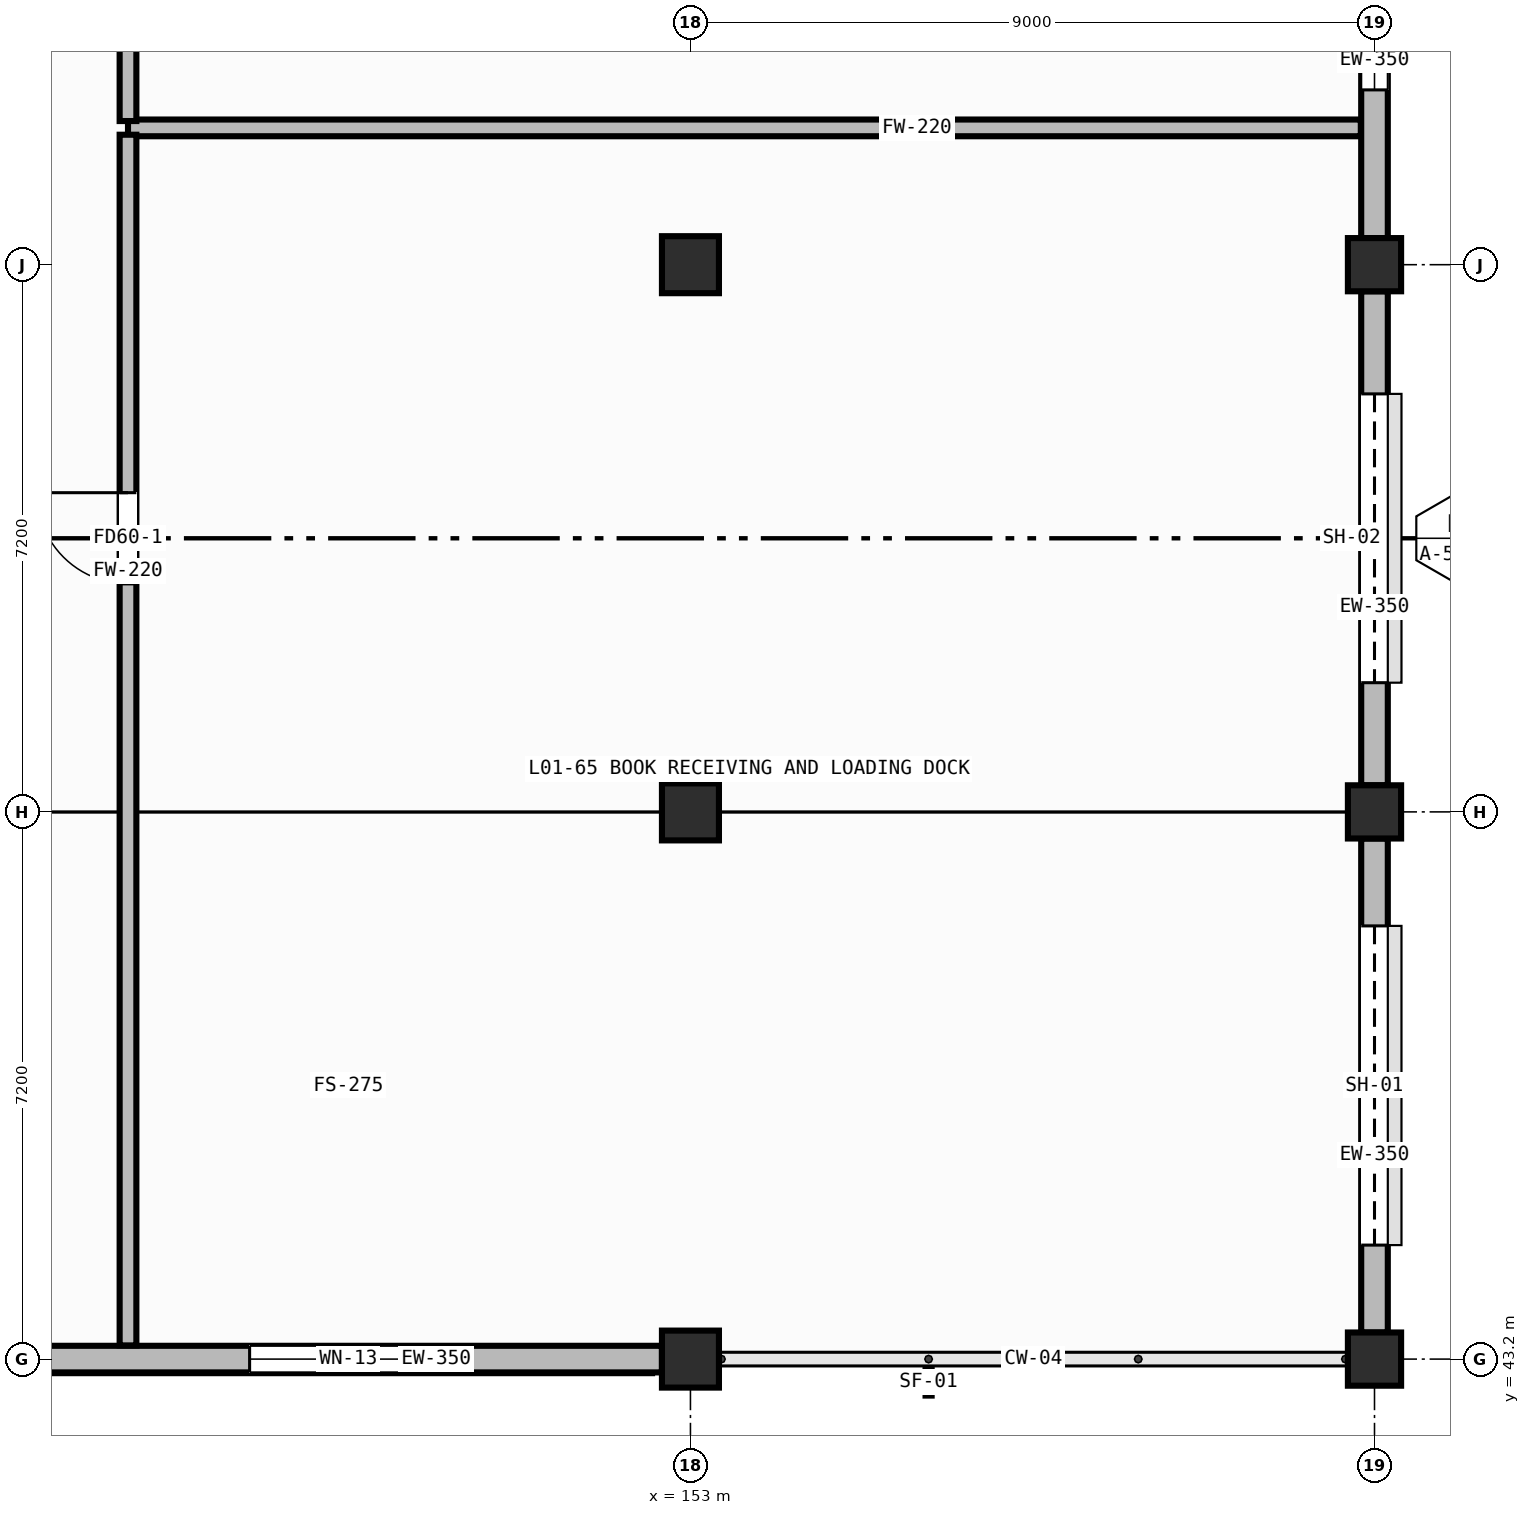
"""IFC4 building model, lengths in metres.
Left out: names, types, materials, properties, quantities, classifications, styles, units other than length and angle.
Written with IfcOpenShell. Run it as: python <this file> out.ifc"""

import sys

from ifc_helpers import new_model, si_unit, direction, frame, frame_2d, origin, origin_2d, place, context, subcontext, project, spatial, rectangle, hollow_rectangle, extrude, element, fill, save


model = new_model("IFC4")
c1 = context("Model", 3, precision=1e-05, world=origin(), true_north=direction((0.0, 1.0)))
c2 = subcontext(c1, "Body", "Model", "MODEL_VIEW")
j1 = project(units=[si_unit("LENGTHUNIT", "METRE"), si_unit("PLANEANGLEUNIT", "RADIAN")], contexts=[c1])
p1 = place(None, origin())
s1 = spatial("IfcSite", under=j1, at=p1, CompositionType="ELEMENT")
p2 = place(p1, origin())
s2 = spatial("IfcBuilding", under=s1, at=p2, CompositionType="ELEMENT")
p3 = place(p2, origin())
s3 = spatial("IfcBuildingStorey", under=s2, at=p3, CompositionType="ELEMENT", Elevation=0.0)
for number, where, z_axis, x_axis in (
    (1, (153.0, 43.2, 0.0), (0.0, 0.0, 1.0), (1.0, 0.0, 0.0)),
    (2, (153.0, 50.4, 0.0), (0.0, 0.0, 1.0), (1.0, 0.0, 0.0)),
    (3, (153.0, 57.6, 0.0), (0.0, 0.0, 1.0), (1.0, 0.0, 0.0)),
):
    element("IfcColumn", number, at=place(p3, frame(where, z_axis=z_axis, x_axis=x_axis)), inside=s3, PredefinedType="COLUMN", context=c2, shape_type="SweptSolid", body=[
        extrude(hollow_rectangle(XDim=0.75, YDim=0.75, WallThickness=0.032, at=origin_2d()), origin(), (0.0, 0.0, 1.0), 4.8),
    ])
for number, where, z_axis, x_axis in (
    (4, (162.0, 43.2, 0.0), (0.0, 0.0, 1.0), (1.0, 0.0, 0.0)),
    (5, (162.0, 50.4, 0.0), (0.0, 0.0, 1.0), (1.0, 0.0, 0.0)),
    (6, (162.0, 57.6, 0.0), (0.0, 0.0, 1.0), (1.0, 0.0, 0.0)),
):
    element("IfcColumn", number, at=place(p3, frame(where, z_axis=z_axis, x_axis=x_axis)), inside=s3, PredefinedType="COLUMN", context=c2, shape_type="SweptSolid", body=[
        extrude(hollow_rectangle(XDim=0.7, YDim=0.7, WallThickness=0.028, at=origin_2d()), origin(), (0.0, 0.0, 1.0), 4.8),
    ])
p4 = place(p3, frame((144.375, 43.2, 0.0), z_axis=(0.0, 0.0, 1.0), x_axis=(1.0, 0.0, 0.0)))
e7 = element("IfcWall", 7, at=p4, inside=s3, PredefinedType="STANDARD", context=c2, shape_type="SweptSolid", body=[
    extrude(rectangle(XDim=8.25, YDim=0.35, at=frame_2d((4.125, 0.0))), origin(), (0.0, 0.0, 1.0), 4.055),
])
p5 = place(p4, frame((2.825, 0.0, 0.85)))
e8 = element("IfcOpeningElement", 8, at=p5, cuts=e7, PredefinedType="OPENING", context=c2, shape_type="SweptSolid", body=[
    extrude(rectangle(XDim=2.6, YDim=1.6, at=frame_2d((1.3, 0.8))), frame((0.0, 0.187, 0.0), z_axis=(0.0, -1.0, 0.0), x_axis=(1.0, 0.0, 0.0)), (0.0, 0.0, 1.0), 0.374),
])
p6 = place(p3, frame((162.0, 50.05, 0.0), z_axis=(0.0, 0.0, 1.0), x_axis=(0.0, -1.0, 0.0)))
e9 = element("IfcWall", 9, at=p6, inside=s3, PredefinedType="STANDARD", context=c2, shape_type="SweptSolid", body=[
    extrude(rectangle(XDim=6.5, YDim=0.35, at=frame_2d((3.25, 0.0))), origin(), (0.0, 0.0, 1.0), 4.055),
])
p7 = place(p6, frame((1.15, 0.0, 0.0)))
e10 = element("IfcOpeningElement", 10, at=p7, cuts=e9, PredefinedType="OPENING", context=c2, shape_type="SweptSolid", body=[
    extrude(rectangle(XDim=4.2, YDim=3.4, at=frame_2d((2.1, 1.7))), frame((0.0, 0.187, 0.0), z_axis=(0.0, -1.0, 0.0), x_axis=(1.0, 0.0, 0.0)), (0.0, 0.0, 1.0), 0.374),
])
p8 = place(p3, frame((162.0, 57.25, 0.0), z_axis=(0.0, 0.0, 1.0), x_axis=(0.0, -1.0, 0.0)))
e11 = element("IfcWall", 11, at=p8, inside=s3, PredefinedType="STANDARD", context=c2, shape_type="SweptSolid", body=[
    extrude(rectangle(XDim=6.5, YDim=0.35, at=frame_2d((3.25, 0.0))), origin(), (0.0, 0.0, 1.0), 4.055),
])
p9 = place(p8, frame((1.35, 0.0, 0.0)))
e12 = element("IfcOpeningElement", 12, at=p9, cuts=e11, PredefinedType="OPENING", context=c2, shape_type="SweptSolid", body=[
    extrude(rectangle(XDim=3.8, YDim=3.25, at=frame_2d((1.9, 1.625))), frame((0.0, 0.187, 0.0), z_axis=(0.0, -1.0, 0.0), x_axis=(1.0, 0.0, 0.0)), (0.0, 0.0, 1.0), 0.374),
])
p10 = place(p3, frame((162.0, 64.45, 0.0), z_axis=(0.0, 0.0, 1.0), x_axis=(0.0, -1.0, 0.0)))
e13 = element("IfcWall", 13, at=p10, inside=s3, PredefinedType="STANDARD", context=c2, shape_type="SweptSolid", body=[
    extrude(rectangle(XDim=6.5, YDim=0.35, at=frame_2d((3.25, 0.0))), origin(), (0.0, 0.0, 1.0), 4.055),
])
p11 = place(p10, frame((1.95, 0.0, 0.85)))
e14 = element("IfcOpeningElement", 14, at=p11, cuts=e13, PredefinedType="OPENING", context=c2, shape_type="SweptSolid", body=[
    extrude(rectangle(XDim=2.6, YDim=1.6, at=frame_2d((1.3, 0.8))), frame((0.0, 0.187, 0.0), z_axis=(0.0, -1.0, 0.0), x_axis=(1.0, 0.0, 0.0)), (0.0, 0.0, 1.0), 0.374),
])
p12 = place(p3, frame((145.6, 59.4, 0.0), z_axis=(0.0, 0.0, 1.0), x_axis=(1.0, 0.0, 0.0)))
e15 = element("IfcWall", 15, at=p12, inside=s3, PredefinedType="PARTITIONING", context=c2, shape_type="SweptSolid", body=[
    extrude(rectangle(XDim=16.22, YDim=0.22, at=frame_2d((8.11, 0.0))), origin(), (0.0, 0.0, 1.0), 4.555),
])
p13 = place(p3, frame((145.6, 43.38, 0.0), z_axis=(0.0, 0.0, 1.0), x_axis=(0.0, 1.0, 0.0)))
e16 = element("IfcWall", 16, at=p13, inside=s3, PredefinedType="PARTITIONING", context=c2, shape_type="SweptSolid", body=[
    extrude(rectangle(XDim=15.93, YDim=0.22, at=frame_2d((7.965, 0.0))), origin(), (0.0, 0.0, 1.0), 4.555),
])
p14 = place(p13, frame((10.02, 0.0, 0.0)))
e17 = element("IfcOpeningElement", 17, at=p14, cuts=e16, PredefinedType="OPENING", context=c2, shape_type="SweptSolid", body=[
    extrude(rectangle(XDim=1.2, YDim=2.1, at=frame_2d((0.6, 1.05))), frame((0.0, 0.122, 0.0), z_axis=(0.0, -1.0, 0.0), x_axis=(1.0, 0.0, 0.0)), (0.0, 0.0, 1.0), 0.244),
])
p15 = place(p3, frame((145.6, 59.49, 0.0), z_axis=(0.0, 0.0, 1.0), x_axis=(0.0, 1.0, 0.0)))
e18 = element("IfcWall", 18, at=p15, inside=s3, PredefinedType="PARTITIONING", context=c2, shape_type="SweptSolid", body=[
    extrude(rectangle(XDim=14.82, YDim=0.22, at=frame_2d((7.41, 0.0))), origin(), (0.0, 0.0, 1.0), 4.555),
])
p16 = place(p15, frame((8.36, 0.0, 0.0)))
e19 = element("IfcOpeningElement", 19, at=p16, cuts=e18, PredefinedType="OPENING", context=c2, shape_type="SweptSolid", body=[
    extrude(rectangle(XDim=1.1, YDim=2.08, at=frame_2d((0.55, 1.04))), frame((0.0, 0.122, 0.0), z_axis=(0.0, -1.0, 0.0), x_axis=(1.0, 0.0, 0.0)), (0.0, 0.0, 1.0), 0.244),
])
p17 = place(p5, origin())
e20 = element("IfcWindow", 20, at=p17, inside=s3, PartitioningType="DOUBLE_PANEL_VERTICAL", PredefinedType="WINDOW", context=c2, shape_type="SweptSolid", body=[
    extrude(rectangle(XDim=2.6, YDim=1.6, at=frame_2d((1.3, 0.8))), frame((0.0, 0.03, 0.0), z_axis=(0.0, -1.0, 0.0), x_axis=(1.0, 0.0, 0.0)), (0.0, 0.0, 1.0), 0.06),
])
fill(e8, e20)
p18 = place(p7, origin())
e21 = element("IfcDoor", 21, at=p18, inside=s3, OperationType="ROLLINGUP", PredefinedType="GATE", context=c2, shape_type="SweptSolid", body=[
    extrude(rectangle(XDim=4.2, YDim=3.4, at=frame_2d((2.1, 1.7))), frame((0.0, 0.025, 0.0), z_axis=(0.0, -1.0, 0.0), x_axis=(1.0, 0.0, 0.0)), (0.0, 0.0, 1.0), 0.05),
])
fill(e10, e21)
p19 = place(p9, origin())
e22 = element("IfcDoor", 22, at=p19, inside=s3, OperationType="ROLLINGUP", PredefinedType="GATE", context=c2, shape_type="SweptSolid", body=[
    extrude(rectangle(XDim=3.8, YDim=3.25, at=frame_2d((1.9, 1.625))), frame((0.0, 0.025, 0.0), z_axis=(0.0, -1.0, 0.0), x_axis=(1.0, 0.0, 0.0)), (0.0, 0.0, 1.0), 0.05),
])
fill(e12, e22)
p20 = place(p11, origin())
e23 = element("IfcWindow", 23, at=p20, inside=s3, PartitioningType="DOUBLE_PANEL_VERTICAL", PredefinedType="WINDOW", context=c2, shape_type="SweptSolid", body=[
    extrude(rectangle(XDim=2.6, YDim=1.6, at=frame_2d((1.3, 0.8))), frame((0.0, 0.03, 0.0), z_axis=(0.0, -1.0, 0.0), x_axis=(1.0, 0.0, 0.0)), (0.0, 0.0, 1.0), 0.06),
])
fill(e14, e23)
p21 = place(p14, origin())
e24 = element("IfcDoor", 24, at=p21, inside=s3, OperationType="SINGLE_SWING_RIGHT", PredefinedType="DOOR", context=c2, shape_type="SweptSolid", body=[
    extrude(rectangle(XDim=1.2, YDim=2.1, at=frame_2d((0.6, 1.05))), frame((0.0, 0.025, 0.0), z_axis=(0.0, -1.0, 0.0), x_axis=(1.0, 0.0, 0.0)), (0.0, 0.0, 1.0), 0.05),
])
fill(e17, e24)
save(model, sys.argv[1])
